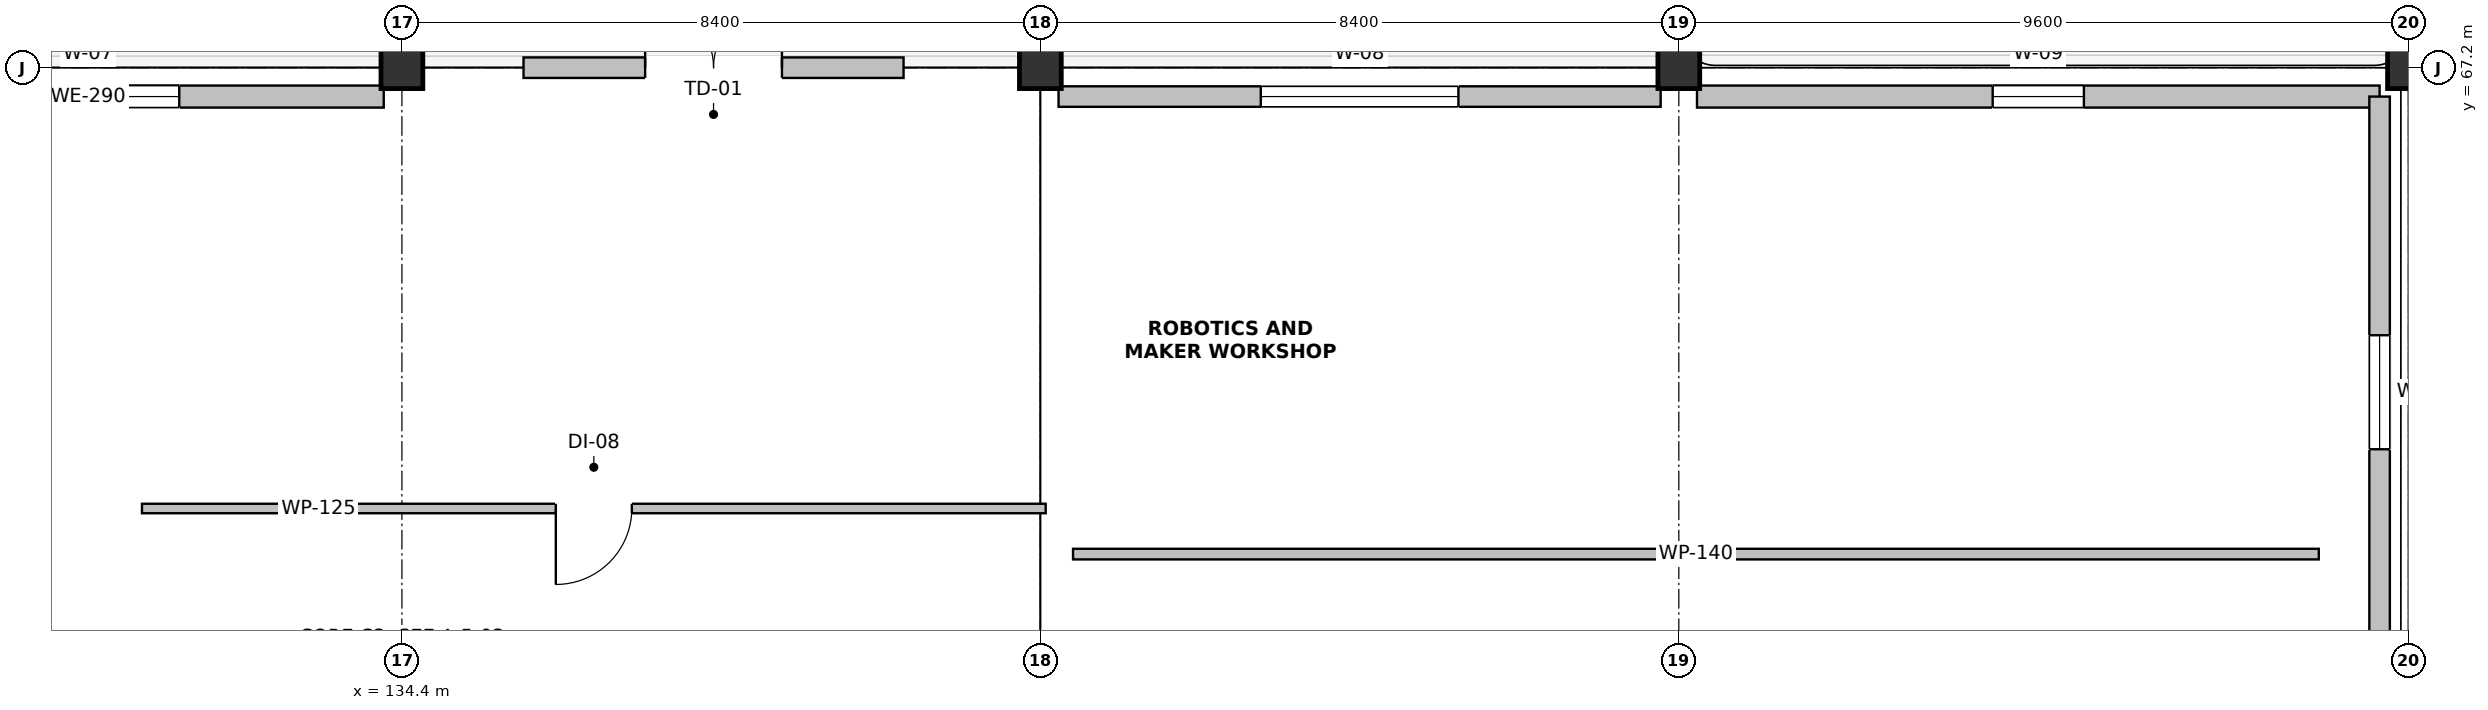
"""IFC4 building model, lengths in metres.
Left out: names, types, materials, properties, quantities, classifications, styles, units other than length and angle.
Written with IfcOpenShell. Run it as: python <this file> out.ifc"""

import sys

from ifc_helpers import new_model, si_unit, direction, frame, frame_2d, origin, origin_2d, place, context, subcontext, project, spatial, rectangle, extrude, element, fill, save


model = new_model("IFC4")
c1 = context("Model", 3, precision=1e-05, world=origin(), true_north=direction((0.0, 1.0)))
c2 = subcontext(c1, "Body", "Model", "MODEL_VIEW")
j1 = project(units=[si_unit("LENGTHUNIT", "METRE"), si_unit("PLANEANGLEUNIT", "RADIAN")], contexts=[c1])
p1 = place(None, origin())
s1 = spatial("IfcSite", under=j1, at=p1, CompositionType="ELEMENT")
p2 = place(p1, origin())
s2 = spatial("IfcBuilding", under=s1, at=p2, CompositionType="ELEMENT")
p3 = place(p2, frame((0.0, 0.0, 9.9)))
s3 = spatial("IfcBuildingStorey", under=s2, at=p3, CompositionType="ELEMENT", Elevation=9.9)
for number, where, z_axis, x_axis in (
    (1, (134.4, 67.2, 0.0), (0.0, 0.0, 1.0), (1.0, 0.0, 0.0)),
    (2, (142.8, 67.2, 0.0), (0.0, 0.0, 1.0), (1.0, 0.0, 0.0)),
    (3, (151.2, 67.2, 0.0), (0.0, 0.0, 1.0), (1.0, 0.0, 0.0)),
    (4, (160.8, 67.2, 0.0), (0.0, 0.0, 1.0), (1.0, 0.0, 0.0)),
):
    element("IfcColumn", number, at=place(p3, frame(where, z_axis=z_axis, x_axis=x_axis)), inside=s3, PredefinedType="COLUMN", context=c2, shape_type="SweptSolid", body=[
        extrude(rectangle(XDim=0.55, YDim=0.55, at=origin_2d()), origin(), (0.0, 0.0, 1.0), 4.5),
    ])
p4 = place(p3, frame((136.0, 67.2, 0.0), z_axis=(0.0, 0.0, 1.0), x_axis=(1.0, 0.0, 0.0)))
e5 = element("IfcWall", 5, at=p4, inside=s3, PredefinedType="SOLIDWALL", context=c2, shape_type="SweptSolid", body=[
    extrude(rectangle(XDim=5.0, YDim=0.27, at=frame_2d((2.5, 0.0))), origin(), (0.0, 0.0, 1.0), 3.58),
])
p5 = place(p4, frame((1.6, 0.0, 0.0)))
e6 = element("IfcOpeningElement", 6, at=p5, cuts=e5, PredefinedType="OPENING", context=c2, shape_type="SweptSolid", body=[
    extrude(rectangle(XDim=1.8, YDim=2.15, at=frame_2d((0.9, 1.075))), frame((0.0, 0.147, 0.0), z_axis=(0.0, -1.0, 0.0), x_axis=(1.0, 0.0, 0.0)), (0.0, 0.0, 1.0), 0.294),
])
p6 = place(p3, frame((126.38, 66.82, 0.0), z_axis=(0.0, 0.0, 1.0), x_axis=(1.0, 0.0, 0.0)))
e7 = element("IfcWall", 7, at=p6, inside=s3, PredefinedType="SOLIDWALL", context=c2, shape_type="SweptSolid", body=[
    extrude(rectangle(XDim=7.781, YDim=0.29, at=frame_2d((3.891, 0.0))), origin(), (0.0, 0.0, 1.0), 3.58),
])
p7 = place(p6, frame((2.69, 0.0, 0.85)))
e8 = element("IfcOpeningElement", 8, at=p7, cuts=e7, PredefinedType="OPENING", context=c2, shape_type="SweptSolid", body=[
    extrude(rectangle(XDim=2.4, YDim=1.4, at=frame_2d((1.2, 0.7))), frame((0.0, 0.157, 0.0), z_axis=(0.0, -1.0, 0.0), x_axis=(1.0, 0.0, 0.0)), (0.0, 0.0, 1.0), 0.314),
])
p8 = place(p3, frame((143.039, 66.82, 0.0), z_axis=(0.0, 0.0, 1.0), x_axis=(1.0, 0.0, 0.0)))
e9 = element("IfcWall", 9, at=p8, inside=s3, PredefinedType="SOLIDWALL", context=c2, shape_type="SweptSolid", body=[
    extrude(rectangle(XDim=7.922, YDim=0.27, at=frame_2d((3.961, 0.0))), origin(), (0.0, 0.0, 1.0), 3.63),
])
p9 = place(p8, frame((2.661, 0.0, 0.85)))
e10 = element("IfcOpeningElement", 10, at=p9, cuts=e9, PredefinedType="OPENING", context=c2, shape_type="SweptSolid", body=[
    extrude(rectangle(XDim=2.6, YDim=1.4, at=frame_2d((1.3, 0.7))), frame((0.0, 0.147, 0.0), z_axis=(0.0, -1.0, 0.0), x_axis=(1.0, 0.0, 0.0)), (0.0, 0.0, 1.0), 0.294),
])
p10 = place(p3, frame((151.439, 66.82, 0.0), z_axis=(0.0, 0.0, 1.0), x_axis=(1.0, 0.0, 0.0)))
e11 = element("IfcWall", 11, at=p10, inside=s3, PredefinedType="SOLIDWALL", context=c2, shape_type="SweptSolid", body=[
    extrude(rectangle(XDim=8.981, YDim=0.29, at=frame_2d((4.49, 0.0))), origin(), (0.0, 0.0, 1.0), 3.43),
])
p11 = place(p10, frame((3.89, 0.0, 0.85)))
e12 = element("IfcOpeningElement", 12, at=p11, cuts=e11, PredefinedType="OPENING", context=c2, shape_type="SweptSolid", body=[
    extrude(rectangle(XDim=1.2, YDim=1.55, at=frame_2d((0.6, 0.775))), frame((0.0, 0.157, 0.0), z_axis=(0.0, -1.0, 0.0), x_axis=(1.0, 0.0, 0.0)), (0.0, 0.0, 1.0), 0.314),
])
p12 = place(p3, frame((160.42, 66.82, 0.0), z_axis=(0.0, 0.0, 1.0), x_axis=(0.0, -1.0, 0.0)))
e13 = element("IfcWall", 13, at=p12, inside=s3, PredefinedType="SOLIDWALL", context=c2, shape_type="SweptSolid", body=[
    extrude(rectangle(XDim=7.781, YDim=0.27, at=frame_2d((3.891, 0.0))), origin(), (0.0, 0.0, 1.0), 3.37),
])
p13 = place(p12, frame((3.14, 0.0, 0.85)))
e14 = element("IfcOpeningElement", 14, at=p13, cuts=e13, PredefinedType="OPENING", context=c2, shape_type="SweptSolid", body=[
    extrude(rectangle(XDim=1.5, YDim=1.55, at=frame_2d((0.75, 0.775))), frame((0.0, 0.147, 0.0), z_axis=(0.0, -1.0, 0.0), x_axis=(1.0, 0.0, 0.0)), (0.0, 0.0, 1.0), 0.294),
])
p14 = place(p3, frame((159.62, 60.8, 0.0), z_axis=(0.0, 0.0, 1.0), x_axis=(-1.0, 0.0, 0.0)))
e15 = element("IfcWall", 15, at=p14, inside=s3, PredefinedType="PARTITIONING", context=c2, shape_type="SweptSolid", body=[
    extrude(rectangle(XDim=16.39, YDim=0.14, at=frame_2d((8.195, 0.0))), origin(), (0.0, 0.0, 1.0), 4.22),
])
p15 = place(p3, frame((142.87, 61.4, 0.0), z_axis=(0.0, 0.0, 1.0), x_axis=(-1.0, 0.0, 0.0)))
e16 = element("IfcWall", 16, at=p15, inside=s3, PredefinedType="PARTITIONING", context=c2, shape_type="SweptSolid", body=[
    extrude(rectangle(XDim=11.89, YDim=0.125, at=frame_2d((5.945, 0.0))), origin(), (0.0, 0.0, 1.0), 3.78),
])
p16 = place(p15, frame((5.445, 0.0, 0.0)))
e17 = element("IfcOpeningElement", 17, at=p16, cuts=e16, PredefinedType="OPENING", context=c2, shape_type="SweptSolid", body=[
    extrude(rectangle(XDim=1.0, YDim=2.15, at=frame_2d((0.5, 1.075))), frame((0.0, 0.074, 0.0), z_axis=(0.0, -1.0, 0.0), x_axis=(1.0, 0.0, 0.0)), (0.0, 0.0, 1.0), 0.149),
])
p17 = place(p5, origin())
e18 = element("IfcDoor", 18, at=p17, inside=s3, OperationType="DOUBLE_DOOR_SINGLE_SWING", PredefinedType="DOOR", context=c2, shape_type="SweptSolid", body=[
    extrude(rectangle(XDim=1.8, YDim=2.15, at=frame_2d((0.9, 1.075))), frame((0.0, 0.025, 0.0), z_axis=(0.0, -1.0, 0.0), x_axis=(1.0, 0.0, 0.0)), (0.0, 0.0, 1.0), 0.05),
])
fill(e6, e18)
p18 = place(p7, origin())
e19 = element("IfcWindow", 19, at=p18, inside=s3, PartitioningType="SINGLE_PANEL", PredefinedType="WINDOW", context=c2, shape_type="SweptSolid", body=[
    extrude(rectangle(XDim=2.4, YDim=1.4, at=frame_2d((1.2, 0.7))), frame((0.0, 0.03, 0.0), z_axis=(0.0, -1.0, 0.0), x_axis=(1.0, 0.0, 0.0)), (0.0, 0.0, 1.0), 0.06),
])
fill(e8, e19)
p19 = place(p9, origin())
e20 = element("IfcWindow", 20, at=p19, inside=s3, PartitioningType="SINGLE_PANEL", PredefinedType="WINDOW", context=c2, shape_type="SweptSolid", body=[
    extrude(rectangle(XDim=2.6, YDim=1.4, at=frame_2d((1.3, 0.7))), frame((0.0, 0.03, 0.0), z_axis=(0.0, -1.0, 0.0), x_axis=(1.0, 0.0, 0.0)), (0.0, 0.0, 1.0), 0.06),
])
fill(e10, e20)
p20 = place(p11, origin())
e21 = element("IfcWindow", 21, at=p20, inside=s3, PartitioningType="SINGLE_PANEL", PredefinedType="WINDOW", context=c2, shape_type="SweptSolid", body=[
    extrude(rectangle(XDim=1.2, YDim=1.55, at=frame_2d((0.6, 0.775))), frame((0.0, 0.03, 0.0), z_axis=(0.0, -1.0, 0.0), x_axis=(1.0, 0.0, 0.0)), (0.0, 0.0, 1.0), 0.06),
])
fill(e12, e21)
p21 = place(p13, origin())
e22 = element("IfcWindow", 22, at=p21, inside=s3, PartitioningType="SINGLE_PANEL", PredefinedType="WINDOW", context=c2, shape_type="SweptSolid", body=[
    extrude(rectangle(XDim=1.5, YDim=1.55, at=frame_2d((0.75, 0.775))), frame((0.0, 0.03, 0.0), z_axis=(0.0, -1.0, 0.0), x_axis=(1.0, 0.0, 0.0)), (0.0, 0.0, 1.0), 0.06),
])
fill(e14, e22)
p22 = place(p16, origin())
e23 = element("IfcDoor", 23, at=p22, inside=s3, OperationType="SINGLE_SWING_RIGHT", PredefinedType="DOOR", context=c2, shape_type="SweptSolid", body=[
    extrude(rectangle(XDim=1.0, YDim=2.15, at=frame_2d((0.5, 1.075))), frame((0.0, 0.025, 0.0), z_axis=(0.0, -1.0, 0.0), x_axis=(1.0, 0.0, 0.0)), (0.0, 0.0, 1.0), 0.05),
])
fill(e17, e23)
save(model, sys.argv[1])
